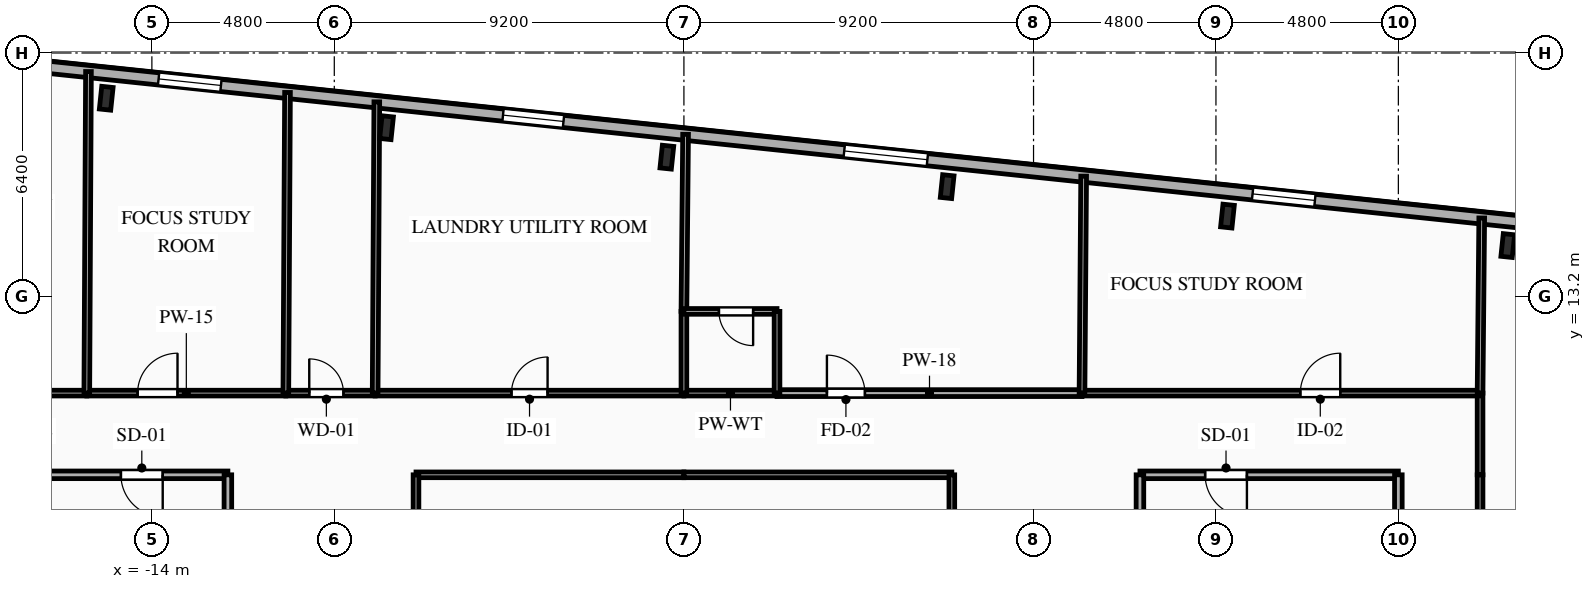
"""IFC4 building model, lengths in metres.
Left out: names, types, materials, properties, quantities, classifications, styles, units other than length and angle.
Written with IfcOpenShell. Run it as: python <this file> out.ifc"""

import sys

from ifc_helpers import new_model, si_unit, direction, frame, frame_2d, origin, origin_2d, place, context, subcontext, project, spatial, rectangle, i_section, extrude, element, fill, save


model = new_model("IFC4")
c1 = context("Model", 3, precision=1e-05, world=origin(), true_north=direction((0.0, 1.0)))
c2 = subcontext(c1, "Body", "Model", "MODEL_VIEW")
j1 = project(units=[si_unit("LENGTHUNIT", "METRE"), si_unit("PLANEANGLEUNIT", "RADIAN")], contexts=[c1])
p1 = place(None, origin())
s1 = spatial("IfcSite", under=j1, at=p1, CompositionType="ELEMENT")
p2 = place(p1, origin())
s2 = spatial("IfcBuilding", under=s1, at=p2, CompositionType="ELEMENT")
p3 = place(p2, frame((0.0, 0.0, 196.4)))
s3 = spatial("IfcBuildingStorey", under=s2, at=p3, CompositionType="ELEMENT", Elevation=196.4)
for number, where, z_axis, x_axis in (
    (1, (21.679, 14.532, 0.0), (0.0, 0.0, 1.0), (0.995, -0.105, 0.0)),
    (2, (14.303, 15.308, 0.0), (0.0, 0.0, 1.0), (0.995, -0.105, 0.0)),
    (3, (6.927, 16.083, 0.0), (0.0, 0.0, 1.0), (0.995, -0.105, 0.0)),
    (4, (-0.449, 16.858, 0.0), (0.0, 0.0, 1.0), (0.995, -0.105, 0.0)),
    (5, (-7.825, 17.634, 0.0), (0.0, 0.0, 1.0), (0.995, -0.105, 0.0)),
    (6, (-15.201, 18.409, 0.0), (0.0, 0.0, 1.0), (0.995, -0.105, 0.0)),
):
    element("IfcColumn", number, at=place(p3, frame(where, z_axis=z_axis, x_axis=x_axis)), inside=s3, PredefinedType="COLUMN", context=c2, shape_type="SweptSolid", body=[
        extrude(i_section(OverallWidth=0.3, OverallDepth=0.6, WebThickness=0.015, FlangeThickness=0.03, FilletRadius=0.027, at=origin_2d()), origin(), (0.0, 0.0, 1.0), 3.35),
    ])
p4 = place(p3, frame((-23.156, 19.898, 0.0), z_axis=(0.0, 0.0, 1.0), x_axis=(0.994522001802, -0.104527450613, 0.0)))
e7 = element("IfcWall", 7, at=p4, inside=s3, PredefinedType="SOLIDWALL", context=c2, shape_type="SweptSolid", body=[
    extrude(rectangle(XDim=45.8, YDim=0.32, at=frame_2d((22.9, 0.0))), origin(), (0.0, 0.0, 1.0), 3.04),
])
p5 = place(p4, frame((4.139, 0.0, 0.85)))
e8 = element("IfcOpeningElement", 8, at=p5, cuts=e7, PredefinedType="OPENING", context=c2, shape_type="SweptSolid", body=[
    extrude(rectangle(XDim=1.65, YDim=1.85, at=frame_2d((0.825, 0.925))), frame((0.0, 0.17, 0.0), z_axis=(0.0, -1.0, 0.0), x_axis=(1.0, 0.0, 0.0)), (0.0, 0.0, 1.0), 0.34),
])
p6 = place(p4, frame((9.384, 0.0, 0.85)))
e9 = element("IfcOpeningElement", 9, at=p6, cuts=e7, PredefinedType="OPENING", context=c2, shape_type="SweptSolid", body=[
    extrude(rectangle(XDim=1.65, YDim=1.85, at=frame_2d((0.825, 0.925))), frame((0.0, 0.17, 0.0), z_axis=(0.0, -1.0, 0.0), x_axis=(1.0, 0.0, 0.0)), (0.0, 0.0, 1.0), 0.34),
])
p7 = place(p4, frame((18.497, 0.0, 0.85)))
e10 = element("IfcOpeningElement", 10, at=p7, cuts=e7, PredefinedType="OPENING", context=c2, shape_type="SweptSolid", body=[
    extrude(rectangle(XDim=1.6, YDim=1.85, at=frame_2d((0.8, 0.925))), frame((0.0, 0.17, 0.0), z_axis=(0.0, -1.0, 0.0), x_axis=(1.0, 0.0, 0.0)), (0.0, 0.0, 1.0), 0.34),
])
p8 = place(p4, frame((27.525, 0.0, 0.85)))
e11 = element("IfcOpeningElement", 11, at=p8, cuts=e7, PredefinedType="OPENING", context=c2, shape_type="SweptSolid", body=[
    extrude(rectangle(XDim=2.2, YDim=1.85, at=frame_2d((1.1, 0.925))), frame((0.0, 0.17, 0.0), z_axis=(0.0, -1.0, 0.0), x_axis=(1.0, 0.0, 0.0)), (0.0, 0.0, 1.0), 0.34),
])
p9 = place(p4, frame((38.329, 0.0, 0.85)))
e12 = element("IfcOpeningElement", 12, at=p9, cuts=e7, PredefinedType="OPENING", context=c2, shape_type="SweptSolid", body=[
    extrude(rectangle(XDim=1.65, YDim=1.85, at=frame_2d((0.825, 0.925))), frame((0.0, 0.17, 0.0), z_axis=(0.0, -1.0, 0.0), x_axis=(1.0, 0.0, 0.0)), (0.0, 0.0, 1.0), 0.34),
])
p10 = place(p3, frame((-12.0, 8.5, 0.0), z_axis=(0.0, 0.0, 1.0), x_axis=(-1.0, 0.0, 0.0)))
e13 = element("IfcWall", 13, at=p10, inside=s3, PredefinedType="PARTITIONING", context=c2, shape_type="SweptSolid", body=[
    extrude(rectangle(XDim=6.8, YDim=0.2, at=frame_2d((3.4, 0.0))), origin(), (0.0, 0.0, 1.0), 3.04),
])
p11 = place(p10, frame((1.715, 0.0, 0.0)))
e14 = element("IfcOpeningElement", 14, at=p11, cuts=e13, PredefinedType="OPENING", context=c2, shape_type="SweptSolid", body=[
    extrude(rectangle(XDim=1.1, YDim=2.15, at=frame_2d((0.55, 1.075))), frame((0.0, 0.11, 0.0), z_axis=(0.0, -1.0, 0.0), x_axis=(1.0, 0.0, 0.0)), (0.0, 0.0, 1.0), 0.22),
])
p12 = place(p3, frame((-12.0, 5.6, 0.0), z_axis=(0.0, 0.0, 1.0), x_axis=(0.0, 1.0, 0.0)))
e15 = element("IfcWall", 15, at=p12, inside=s3, PredefinedType="PARTITIONING", context=c2, shape_type="SweptSolid", body=[
    extrude(rectangle(XDim=2.9, YDim=0.2, at=frame_2d((1.45, 0.0))), origin(), (0.0, 0.0, 1.0), 3.04),
])
p13 = place(p3, frame((18.8, 8.5, 0.0), z_axis=(0.0, 0.0, 1.0), x_axis=(-1.0, 0.0, 0.0)))
e16 = element("IfcWall", 16, at=p13, inside=s3, PredefinedType="PARTITIONING", context=c2, shape_type="SweptSolid", body=[
    extrude(rectangle(XDim=6.8, YDim=0.2, at=frame_2d((3.4, 0.0))), origin(), (0.0, 0.0, 1.0), 3.04),
])
p14 = place(p13, frame((3.985, 0.0, 0.0)))
e17 = element("IfcOpeningElement", 17, at=p14, cuts=e16, PredefinedType="OPENING", context=c2, shape_type="SweptSolid", body=[
    extrude(rectangle(XDim=1.1, YDim=2.15, at=frame_2d((0.55, 1.075))), frame((0.0, 0.11, 0.0), z_axis=(0.0, -1.0, 0.0), x_axis=(1.0, 0.0, 0.0)), (0.0, 0.0, 1.0), 0.22),
])
p15 = place(p3, frame((18.8, 5.6, 0.0), z_axis=(0.0, 0.0, 1.0), x_axis=(0.0, 1.0, 0.0)))
e18 = element("IfcWall", 18, at=p15, inside=s3, PredefinedType="PARTITIONING", context=c2, shape_type="SweptSolid", body=[
    extrude(rectangle(XDim=2.9, YDim=0.2, at=frame_2d((1.45, 0.0))), origin(), (0.0, 0.0, 1.0), 2.665),
])
p16 = place(p3, frame((12.0, 8.5, 0.0), z_axis=(0.0, 0.0, 1.0), x_axis=(0.0, -1.0, 0.0)))
e19 = element("IfcWall", 19, at=p16, inside=s3, PredefinedType="PARTITIONING", context=c2, shape_type="SweptSolid", body=[
    extrude(rectangle(XDim=2.9, YDim=0.2, at=frame_2d((1.45, 0.0))), origin(), (0.0, 0.0, 1.0), 3.04),
])
p17 = place(p3, frame((-20.95, 10.65, 0.0), z_axis=(0.0, 0.0, 1.0), x_axis=(1.0, 0.0, 0.0)))
e20 = element("IfcWall", 20, at=p17, inside=s3, PredefinedType="PARTITIONING", context=c2, shape_type="SweptSolid", body=[
    extrude(rectangle(XDim=5.238, YDim=0.15, at=frame_2d((2.619, 0.0))), origin(), (0.0, 0.0, 1.0), 3.04),
])
p18 = place(p17, frame((3.229, 0.0, 0.0)))
e21 = element("IfcOpeningElement", 21, at=p18, cuts=e20, PredefinedType="OPENING", context=c2, shape_type="SweptSolid", body=[
    extrude(rectangle(XDim=1.05, YDim=2.15, at=frame_2d((0.525, 1.075))), frame((0.0, 0.085, 0.0), z_axis=(0.0, -1.0, 0.0), x_axis=(1.0, 0.0, 0.0)), (0.0, 0.0, 1.0), 0.17),
])
p19 = place(p3, frame((-15.712, 10.65, 0.0), z_axis=(0.0, 0.0, 1.0), x_axis=(1.0, 0.0, 0.0)))
e22 = element("IfcWall", 22, at=p19, inside=s3, PredefinedType="PARTITIONING", context=c2, shape_type="SweptSolid", body=[
    extrude(rectangle(XDim=5.237, YDim=0.15, at=frame_2d((2.619, 0.0))), origin(), (0.0, 0.0, 1.0), 3.04),
])
p20 = place(p19, frame((1.337, 0.0, 0.0)))
e23 = element("IfcOpeningElement", 23, at=p20, cuts=e22, PredefinedType="OPENING", context=c2, shape_type="SweptSolid", body=[
    extrude(rectangle(XDim=1.05, YDim=2.15, at=frame_2d((0.525, 1.075))), frame((0.0, 0.085, 0.0), z_axis=(0.0, -1.0, 0.0), x_axis=(1.0, 0.0, 0.0)), (0.0, 0.0, 1.0), 0.17),
])
p21 = place(p3, frame((-10.475, 10.65, 0.0), z_axis=(0.0, 0.0, 1.0), x_axis=(1.0, 0.0, 0.0)))
e24 = element("IfcWall", 24, at=p21, inside=s3, PredefinedType="PLUMBINGWALL", context=c2, shape_type="SweptSolid", body=[
    extrude(rectangle(XDim=2.35, YDim=0.15, at=frame_2d((1.175, 0.0))), origin(), (0.0, 0.0, 1.0), 3.04),
])
p22 = place(p21, frame((0.616, 0.0, 0.0)))
e25 = element("IfcOpeningElement", 25, at=p22, cuts=e24, PredefinedType="OPENING", context=c2, shape_type="SweptSolid", body=[
    extrude(rectangle(XDim=0.9, YDim=2.1, at=frame_2d((0.45, 1.05))), frame((0.0, 0.085, 0.0), z_axis=(0.0, -1.0, 0.0), x_axis=(1.0, 0.0, 0.0)), (0.0, 0.0, 1.0), 0.17),
])
p23 = place(p3, frame((-8.125, 10.65, 0.0), z_axis=(0.0, 0.0, 1.0), x_axis=(1.0, 0.0, 0.0)))
e26 = element("IfcWall", 26, at=p23, inside=s3, PredefinedType="PARTITIONING", context=c2, shape_type="SweptSolid", body=[
    extrude(rectangle(XDim=8.125, YDim=0.15, at=frame_2d((4.062, 0.0))), origin(), (0.0, 0.0, 1.0), 3.04),
])
p24 = place(p23, frame((3.587, 0.0, 0.0)))
e27 = element("IfcOpeningElement", 27, at=p24, cuts=e26, PredefinedType="OPENING", context=c2, shape_type="SweptSolid", body=[
    extrude(rectangle(XDim=0.95, YDim=2.1, at=frame_2d((0.475, 1.05))), frame((0.0, 0.085, 0.0), z_axis=(0.0, -1.0, 0.0), x_axis=(1.0, 0.0, 0.0)), (0.0, 0.0, 1.0), 0.17),
])
p25 = place(p3, frame((0.0, 8.5, 0.0), z_axis=(0.0, 0.0, 1.0), x_axis=(-1.0, 0.0, 0.0)))
e28 = element("IfcWall", 28, at=p25, inside=s3, PredefinedType="PARTITIONING", context=c2, shape_type="SweptSolid", body=[
    extrude(rectangle(XDim=7.05, YDim=0.15, at=frame_2d((3.525, 0.0))), origin(), (0.0, 0.0, 1.0), 3.04),
])
p26 = place(p3, frame((20.95, 10.65, 0.0), z_axis=(0.0, 0.0, 1.0), x_axis=(0.0, -1.0, 0.0)))
e29 = element("IfcWall", 29, at=p26, inside=s3, PredefinedType="PARTITIONING", context=c2, shape_type="SweptSolid", body=[
    extrude(rectangle(XDim=2.15, YDim=0.15, at=frame_2d((1.075, 0.0))), origin(), (0.0, 0.0, 1.0), 3.04),
])
p27 = place(p3, frame((2.45, 10.65, 0.0), z_axis=(0.0, 0.0, 1.0), x_axis=(1.0, 0.0, 0.0)))
e30 = element("IfcWall", 30, at=p27, inside=s3, PredefinedType="PARTITIONING", context=c2, shape_type="SweptSolid", body=[
    extrude(rectangle(XDim=8.025, YDim=0.18, at=frame_2d((4.013, 0.0))), origin(), (0.0, 0.0, 1.0), 3.04),
])
p28 = place(p27, frame((1.313, 0.0, 0.0)))
e31 = element("IfcOpeningElement", 31, at=p28, cuts=e30, PredefinedType="OPENING", context=c2, shape_type="SweptSolid", body=[
    extrude(rectangle(XDim=1.0, YDim=2.15, at=frame_2d((0.5, 1.075))), frame((0.0, 0.1, 0.0), z_axis=(0.0, -1.0, 0.0), x_axis=(1.0, 0.0, 0.0)), (0.0, 0.0, 1.0), 0.2),
])
p29 = place(p3, frame((0.0, 10.65, 0.0), z_axis=(0.0, 0.0, 1.0), x_axis=(1.0, 0.0, 0.0)))
e32 = element("IfcWall", 32, at=p29, inside=s3, PredefinedType="PLUMBINGWALL", context=c2, shape_type="SweptSolid", body=[
    extrude(rectangle(XDim=2.45, YDim=0.15, at=frame_2d((1.225, 0.0))), origin(), (0.0, 0.0, 1.0), 3.04),
])
p30 = place(p3, frame((10.475, 10.65, 0.0), z_axis=(0.0, 0.0, 1.0), x_axis=(1.0, 0.0, 0.0)))
e33 = element("IfcWall", 33, at=p30, inside=s3, PredefinedType="PARTITIONING", context=c2, shape_type="SweptSolid", body=[
    extrude(rectangle(XDim=10.475, YDim=0.15, at=frame_2d((5.237, 0.0))), origin(), (0.0, 0.0, 1.0), 3.04),
])
p31 = place(p30, frame((5.746, 0.0, 0.0)))
e34 = element("IfcOpeningElement", 34, at=p31, cuts=e33, PredefinedType="OPENING", context=c2, shape_type="SweptSolid", body=[
    extrude(rectangle(XDim=1.05, YDim=2.15, at=frame_2d((0.525, 1.075))), frame((0.0, 0.085, 0.0), z_axis=(0.0, -1.0, 0.0), x_axis=(1.0, 0.0, 0.0)), (0.0, 0.0, 1.0), 0.17),
])
p32 = place(p3, frame((7.05, 8.5, 0.0), z_axis=(0.0, 0.0, 1.0), x_axis=(-1.0, 0.0, 0.0)))
e35 = element("IfcWall", 35, at=p32, inside=s3, PredefinedType="PARTITIONING", context=c2, shape_type="SweptSolid", body=[
    extrude(rectangle(XDim=7.05, YDim=0.15, at=frame_2d((3.525, 0.0))), origin(), (0.0, 0.0, 1.0), 3.04),
])
p33 = place(p3, frame((20.95, 8.5, 0.0), z_axis=(0.0, 0.0, 1.0), x_axis=(0.0, -1.0, 0.0)))
e36 = element("IfcWall", 36, at=p33, inside=s3, PredefinedType="PARTITIONING", context=c2, shape_type="SweptSolid", body=[
    extrude(rectangle(XDim=9.263, YDim=0.15, at=frame_2d((4.632, 0.0))), origin(), (0.0, 0.0, 1.0), 2.695),
])
p34 = place(p33, frame((6.751, 0.0, 0.0)))
e37 = element("IfcOpeningElement", 37, at=p34, cuts=e36, PredefinedType="OPENING", context=c2, shape_type="SweptSolid", body=[
    extrude(rectangle(XDim=1.05, YDim=2.15, at=frame_2d((0.525, 1.075))), frame((0.0, 0.085, 0.0), z_axis=(0.0, -1.0, 0.0), x_axis=(1.0, 0.0, 0.0)), (0.0, 0.0, 1.0), 0.17),
])
for number, where, z_axis, x_axis in (
    (38, (-7.05, 8.5, 0.0), (0.0, 0.0, 1.0), (0.0, -1.0, 0.0)),
    (39, (7.05, -0.8, 0.0), (0.0, 0.0, 1.0), (0.0, 1.0, 0.0)),
):
    element("IfcWall", number, at=place(p3, frame(where, z_axis=z_axis, x_axis=x_axis)), inside=s3, PredefinedType="PARTITIONING", context=c2, shape_type="SweptSolid", body=[
        extrude(rectangle(XDim=9.3, YDim=0.15, at=frame_2d((4.65, 0.0))), origin(), (0.0, 0.0, 1.0), 3.04),
    ])
p35 = place(p3, frame((20.95, 10.65, 0.0), z_axis=(0.0, 0.0, 1.0), x_axis=(0.009535990233, 0.999954531411, 0.0)))
e40 = element("IfcWall", 40, at=p35, inside=s3, PredefinedType="PARTITIONING", context=c2, shape_type="SweptSolid", body=[
    extrude(rectangle(XDim=4.608, YDim=0.15, at=frame_2d((2.304, 0.0))), origin(), (0.0, 0.0, 1.0), 2.665),
])
p36 = place(p3, frame((-15.669, 19.112, 0.0), z_axis=(0.0, 0.0, 1.0), x_axis=(-0.005164534834, -0.999986663701, 0.0)))
e41 = element("IfcWall", 41, at=p36, inside=s3, PredefinedType="PARTITIONING", context=c2, shape_type="SweptSolid", body=[
    extrude(rectangle(XDim=8.462, YDim=0.15, at=frame_2d((4.231, 0.0))), origin(), (0.0, 0.0, 1.0), 2.665),
])
p37 = place(p3, frame((-10.431, 18.561, 0.0), z_axis=(0.0, 0.0, 1.0), x_axis=(-0.005554784069, -0.999984572068, 0.0)))
e42 = element("IfcWall", 42, at=p37, inside=s3, PredefinedType="PLUMBINGWALL", context=c2, shape_type="SweptSolid", body=[
    extrude(rectangle(XDim=7.911, YDim=0.15, at=frame_2d((3.956, 0.0))), origin(), (0.0, 0.0, 1.0), 3.04),
])
p38 = place(p3, frame((-8.081, 18.314, 0.0), z_axis=(0.0, 0.0, 1.0), x_axis=(-0.005733850696, -0.999983561343, 0.0)))
e43 = element("IfcWall", 43, at=p38, inside=s3, PredefinedType="PLUMBINGWALL", context=c2, shape_type="SweptSolid", body=[
    extrude(rectangle(XDim=7.664, YDim=0.15, at=frame_2d((3.832, 0.0))), origin(), (0.0, 0.0, 1.0), 2.665),
])
p39 = place(p3, frame((0.044, 17.46, 0.0), z_axis=(0.0, 0.0, 1.0), x_axis=(-0.009430083116, -0.999955535778, 0.0)))
e44 = element("IfcWall", 44, at=p39, inside=s3, PredefinedType="PARTITIONING", context=c2, shape_type="SweptSolid", body=[
    extrude(rectangle(XDim=4.66, YDim=0.15, at=frame_2d((2.33, 0.0))), origin(), (0.0, 0.0, 1.0), 3.04),
])
p40 = place(p3, frame((0.0, 12.8, 0.0), z_axis=(0.0, 0.0, 1.0), x_axis=(0.0, -1.0, 0.0)))
e45 = element("IfcWall", 45, at=p40, inside=s3, PredefinedType="PLUMBINGWALL", context=c2, shape_type="SweptSolid", body=[
    extrude(rectangle(XDim=2.15, YDim=0.15, at=frame_2d((1.075, 0.0))), origin(), (0.0, 0.0, 1.0), 3.04),
])
p41 = place(p3, frame((2.45, 12.8, 0.0), z_axis=(0.0, 0.0, 1.0), x_axis=(-1.0, 0.0, 0.0)))
e46 = element("IfcWall", 46, at=p41, inside=s3, PredefinedType="PLUMBINGWALL", context=c2, shape_type="SweptSolid", body=[
    extrude(rectangle(XDim=2.45, YDim=0.15, at=frame_2d((1.225, 0.0))), origin(), (0.0, 0.0, 1.0), 3.04),
])
p42 = place(p41, frame((0.629, 0.0, 0.0)))
e47 = element("IfcOpeningElement", 47, at=p42, cuts=e46, PredefinedType="OPENING", context=c2, shape_type="SweptSolid", body=[
    extrude(rectangle(XDim=0.9, YDim=2.1, at=frame_2d((0.45, 1.05))), frame((0.0, 0.085, 0.0), z_axis=(0.0, -1.0, 0.0), x_axis=(1.0, 0.0, 0.0)), (0.0, 0.0, 1.0), 0.17),
])
p43 = place(p3, frame((2.45, 10.65, 0.0), z_axis=(0.0, 0.0, 1.0), x_axis=(0.0, 1.0, 0.0)))
e48 = element("IfcWall", 48, at=p43, inside=s3, PredefinedType="PLUMBINGWALL", context=c2, shape_type="SweptSolid", body=[
    extrude(rectangle(XDim=2.15, YDim=0.15, at=frame_2d((1.075, 0.0))), origin(), (0.0, 0.0, 1.0), 3.04),
])
p44 = place(p3, frame((10.519, 16.359, 0.0), z_axis=(0.0, 0.0, 1.0), x_axis=(-0.007654255135, -0.99997070576, 0.0)))
e49 = element("IfcWall", 49, at=p44, inside=s3, PredefinedType="PARTITIONING", context=c2, shape_type="SweptSolid", body=[
    extrude(rectangle(XDim=5.709, YDim=0.15, at=frame_2d((2.855, 0.0))), origin(), (0.0, 0.0, 1.0), 3.04),
])
p45 = place(p6, origin())
e50 = element("IfcWindow", 50, at=p45, inside=s3, PartitioningType="SINGLE_PANEL", PredefinedType="WINDOW", context=c2, shape_type="SweptSolid", body=[
    extrude(rectangle(XDim=1.65, YDim=1.85, at=frame_2d((0.825, 0.925))), frame((0.0, 0.03, 0.0), z_axis=(0.0, -1.0, 0.0), x_axis=(1.0, 0.0, 0.0)), (0.0, 0.0, 1.0), 0.06),
])
fill(e9, e50)
p46 = place(p7, origin())
e51 = element("IfcWindow", 51, at=p46, inside=s3, PartitioningType="SINGLE_PANEL", PredefinedType="WINDOW", context=c2, shape_type="SweptSolid", body=[
    extrude(rectangle(XDim=1.6, YDim=1.85, at=frame_2d((0.8, 0.925))), frame((0.0, 0.03, 0.0), z_axis=(0.0, -1.0, 0.0), x_axis=(1.0, 0.0, 0.0)), (0.0, 0.0, 1.0), 0.06),
])
fill(e10, e51)
p47 = place(p8, origin())
e52 = element("IfcWindow", 52, at=p47, inside=s3, PartitioningType="SINGLE_PANEL", PredefinedType="WINDOW", context=c2, shape_type="SweptSolid", body=[
    extrude(rectangle(XDim=2.2, YDim=1.85, at=frame_2d((1.1, 0.925))), frame((0.0, 0.03, 0.0), z_axis=(0.0, -1.0, 0.0), x_axis=(1.0, 0.0, 0.0)), (0.0, 0.0, 1.0), 0.06),
])
fill(e11, e52)
p48 = place(p9, origin())
e53 = element("IfcWindow", 53, at=p48, inside=s3, PartitioningType="SINGLE_PANEL", PredefinedType="WINDOW", context=c2, shape_type="SweptSolid", body=[
    extrude(rectangle(XDim=1.65, YDim=1.85, at=frame_2d((0.825, 0.925))), frame((0.0, 0.03, 0.0), z_axis=(0.0, -1.0, 0.0), x_axis=(1.0, 0.0, 0.0)), (0.0, 0.0, 1.0), 0.06),
])
fill(e12, e53)
p49 = place(p11, origin())
e54 = element("IfcDoor", 54, at=p49, inside=s3, OperationType="SINGLE_SWING_LEFT", PredefinedType="DOOR", context=c2, shape_type="SweptSolid", body=[
    extrude(rectangle(XDim=1.1, YDim=2.15, at=frame_2d((0.55, 1.075))), frame((0.0, 0.025, 0.0), z_axis=(0.0, -1.0, 0.0), x_axis=(1.0, 0.0, 0.0)), (0.0, 0.0, 1.0), 0.05),
])
fill(e14, e54)
p50 = place(p14, origin())
e55 = element("IfcDoor", 55, at=p50, inside=s3, OperationType="SINGLE_SWING_LEFT", PredefinedType="DOOR", context=c2, shape_type="SweptSolid", body=[
    extrude(rectangle(XDim=1.1, YDim=2.15, at=frame_2d((0.55, 1.075))), frame((0.0, 0.025, 0.0), z_axis=(0.0, -1.0, 0.0), x_axis=(1.0, 0.0, 0.0)), (0.0, 0.0, 1.0), 0.05),
])
fill(e17, e55)
p51 = place(p20, origin())
e56 = element("IfcDoor", 56, at=p51, inside=s3, OperationType="SINGLE_SWING_RIGHT", PredefinedType="DOOR", context=c2, shape_type="SweptSolid", body=[
    extrude(rectangle(XDim=1.05, YDim=2.15, at=frame_2d((0.525, 1.075))), frame((0.0, 0.025, 0.0), z_axis=(0.0, -1.0, 0.0), x_axis=(1.0, 0.0, 0.0)), (0.0, 0.0, 1.0), 0.05),
])
fill(e23, e56)
p52 = place(p22, origin())
e57 = element("IfcDoor", 57, at=p52, inside=s3, OperationType="SINGLE_SWING_LEFT", PredefinedType="DOOR", context=c2, shape_type="SweptSolid", body=[
    extrude(rectangle(XDim=0.9, YDim=2.1, at=frame_2d((0.45, 1.05))), frame((0.0, 0.025, 0.0), z_axis=(0.0, -1.0, 0.0), x_axis=(1.0, 0.0, 0.0)), (0.0, 0.0, 1.0), 0.05),
])
fill(e25, e57)
p53 = place(p24, origin())
e58 = element("IfcDoor", 58, at=p53, inside=s3, OperationType="SINGLE_SWING_RIGHT", PredefinedType="DOOR", context=c2, shape_type="SweptSolid", body=[
    extrude(rectangle(XDim=0.95, YDim=2.1, at=frame_2d((0.475, 1.05))), frame((0.0, 0.025, 0.0), z_axis=(0.0, -1.0, 0.0), x_axis=(1.0, 0.0, 0.0)), (0.0, 0.0, 1.0), 0.05),
])
fill(e27, e58)
p54 = place(p28, origin())
e59 = element("IfcDoor", 59, at=p54, inside=s3, OperationType="SINGLE_SWING_LEFT", PredefinedType="DOOR", context=c2, shape_type="SweptSolid", body=[
    extrude(rectangle(XDim=1.0, YDim=2.15, at=frame_2d((0.5, 1.075))), frame((0.0, 0.025, 0.0), z_axis=(0.0, -1.0, 0.0), x_axis=(1.0, 0.0, 0.0)), (0.0, 0.0, 1.0), 0.05),
])
fill(e31, e59)
p55 = place(p31, origin())
e60 = element("IfcDoor", 60, at=p55, inside=s3, OperationType="SINGLE_SWING_RIGHT", PredefinedType="DOOR", context=c2, shape_type="SweptSolid", body=[
    extrude(rectangle(XDim=1.05, YDim=2.15, at=frame_2d((0.525, 1.075))), frame((0.0, 0.025, 0.0), z_axis=(0.0, -1.0, 0.0), x_axis=(1.0, 0.0, 0.0)), (0.0, 0.0, 1.0), 0.05),
])
fill(e34, e60)
p56 = place(p42, origin())
e61 = element("IfcDoor", 61, at=p56, inside=s3, OperationType="SINGLE_SWING_LEFT", PredefinedType="DOOR", context=c2, shape_type="SweptSolid", body=[
    extrude(rectangle(XDim=0.9, YDim=2.1, at=frame_2d((0.45, 1.05))), frame((0.0, 0.025, 0.0), z_axis=(0.0, -1.0, 0.0), x_axis=(1.0, 0.0, 0.0)), (0.0, 0.0, 1.0), 0.05),
])
fill(e47, e61)
save(model, sys.argv[1])
